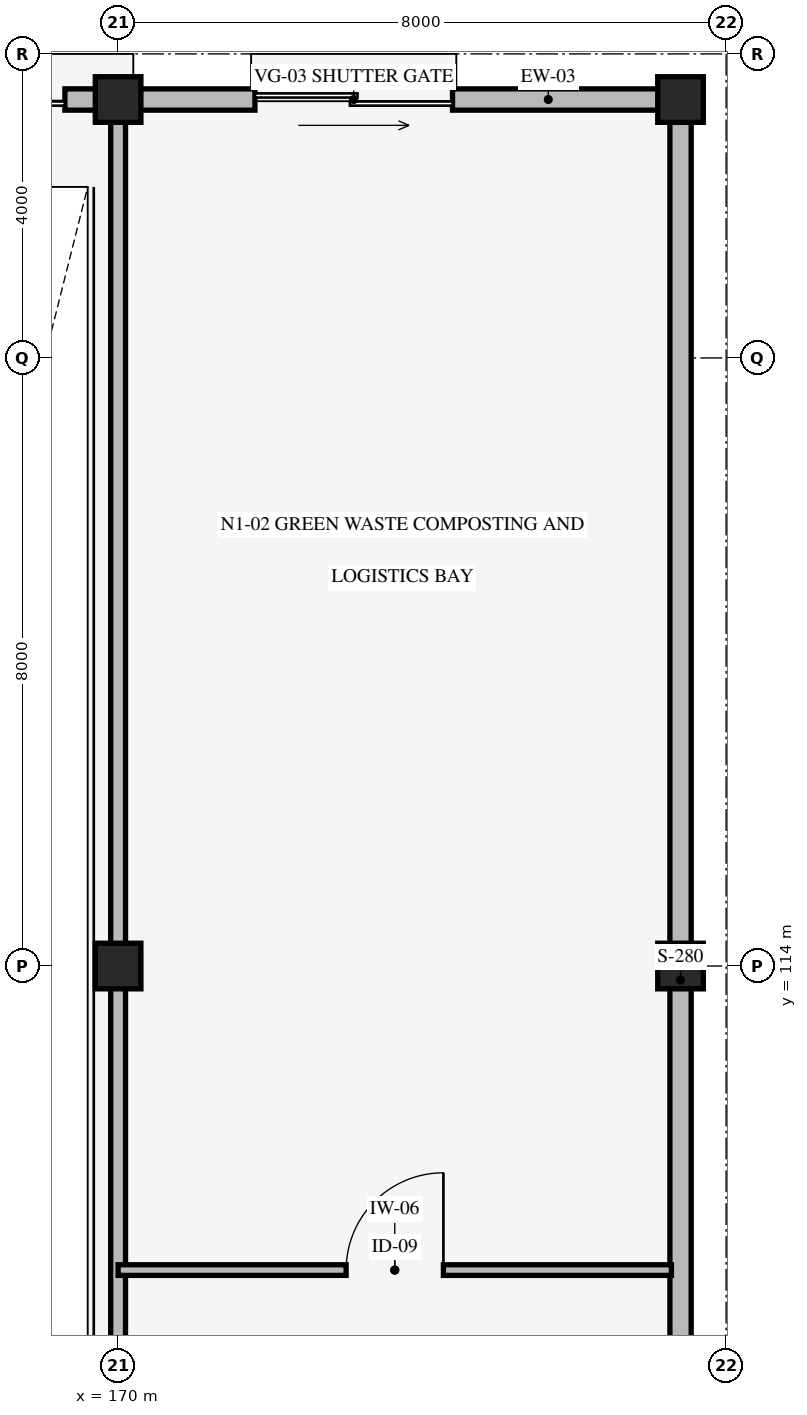
"""IFC4 building model, lengths in metres.
Left out: names, types, materials, properties, quantities, classifications, styles, units other than length and angle.
Written with IfcOpenShell. Run it as: python <this file> out.ifc"""

import sys

from ifc_helpers import new_model, si_unit, direction, frame, frame_2d, origin, origin_2d, place, context, subcontext, project, spatial, rectangle, extrude, element, fill, save


model = new_model("IFC4")
c1 = context("Model", 3, precision=1e-05, world=origin(), true_north=direction((0.0, 1.0)))
c2 = subcontext(c1, "Body", "Model", "MODEL_VIEW")
j1 = project(units=[si_unit("LENGTHUNIT", "METRE"), si_unit("PLANEANGLEUNIT", "RADIAN")], contexts=[c1])
p1 = place(None, origin())
s1 = spatial("IfcSite", under=j1, at=p1, CompositionType="ELEMENT")
p2 = place(p1, origin())
s2 = spatial("IfcBuilding", under=s1, at=p2, CompositionType="ELEMENT")
p3 = place(p2, origin())
s3 = spatial("IfcBuildingStorey", under=s2, at=p3, CompositionType="ELEMENT", Elevation=0.0)
p4 = place(p3, frame((170.0, 114.0, -0.28), z_axis=(0.0, 0.0, 1.0), x_axis=(1.0, 0.0, 0.0)))
e1 = element("IfcColumn", 1, at=p4, inside=s3, PredefinedType="COLUMN", context=c2, shape_type="SweptSolid", body=[
    extrude(rectangle(XDim=0.6, YDim=0.6, at=origin_2d()), origin(), (0.0, 0.0, 1.0), 6.8),
])
p5 = place(p3, frame((177.4, 114.0, -0.28), z_axis=(0.0, 0.0, 1.0), x_axis=(1.0, 0.0, 0.0)))
e2 = element("IfcColumn", 2, at=p5, inside=s3, PredefinedType="COLUMN", context=c2, shape_type="SweptSolid", body=[
    extrude(rectangle(XDim=0.6, YDim=0.6, at=origin_2d()), origin(), (0.0, 0.0, 1.0), 7.586),
])
p6 = place(p3, frame((170.0, 125.4, -0.28), z_axis=(0.0, 0.0, 1.0), x_axis=(1.0, 0.0, 0.0)))
e3 = element("IfcColumn", 3, at=p6, inside=s3, PredefinedType="COLUMN", context=c2, shape_type="SweptSolid", body=[
    extrude(rectangle(XDim=0.6, YDim=0.6, at=origin_2d()), origin(), (0.0, 0.0, 1.0), 6.8),
])
p7 = place(p3, frame((177.4, 125.4, -0.28), z_axis=(0.0, 0.0, 1.0), x_axis=(1.0, 0.0, 0.0)))
e4 = element("IfcColumn", 4, at=p7, inside=s3, PredefinedType="COLUMN", context=c2, shape_type="SweptSolid", body=[
    extrude(rectangle(XDim=0.6, YDim=0.6, at=origin_2d()), origin(), (0.0, 0.0, 1.0), 7.586),
])
p8 = place(p3, frame((162.0, 125.4, 0.0), z_axis=(0.0, 0.0, 1.0), x_axis=(1.0, 0.0, 0.0)))
e5 = element("IfcWall", 5, at=p8, inside=s3, PredefinedType="STANDARD", context=c2, shape_type="SweptSolid", body=[
    extrude(rectangle(XDim=15.4, YDim=0.28, at=frame_2d((7.7, 0.0))), origin(), (0.0, 0.0, 1.0), 5.7),
])
p9 = place(p8, frame((0.7, 0.0, 0.0)))
e6 = element("IfcOpeningElement", 6, at=p9, cuts=e5, PredefinedType="OPENING", context=c2, shape_type="SweptSolid", body=[
    extrude(rectangle(XDim=6.6, YDim=3.2, at=frame_2d((3.3, 1.6))), frame((0.0, 0.15, 0.0), z_axis=(0.0, -1.0, 0.0), x_axis=(1.0, 0.0, 0.0)), (0.0, 0.0, 1.0), 0.3),
])
p10 = place(p8, frame((9.8, 0.0, 0.0)))
e7 = element("IfcOpeningElement", 7, at=p10, cuts=e5, PredefinedType="OPENING", context=c2, shape_type="SweptSolid", body=[
    extrude(rectangle(XDim=2.6, YDim=2.5, at=frame_2d((1.3, 1.25))), frame((0.0, 0.15, 0.0), z_axis=(0.0, -1.0, 0.0), x_axis=(1.0, 0.0, 0.0)), (0.0, 0.0, 1.0), 0.3),
])
p11 = place(p3, frame((177.4, 125.4, 0.0), z_axis=(0.0, 0.0, 1.0), x_axis=(0.0, -1.0, 0.0)))
e8 = element("IfcWall", 8, at=p11, inside=s3, PredefinedType="STANDARD", context=c2, shape_type="SweptSolid", body=[
    extrude(rectangle(XDim=19.4, YDim=0.28, at=frame_2d((9.7, 0.0))), origin(), (0.0, 0.0, 1.0), 5.7),
])
p12 = place(p3, frame((170.0, 82.05, 0.0), z_axis=(0.0, 0.0, 1.0), x_axis=(0.0, 1.0, 0.0)))
e9 = element("IfcWall", 9, at=p12, inside=s3, PredefinedType="STANDARD", context=c2, shape_type="SweptSolid", body=[
    extrude(rectangle(XDim=43.3, YDim=0.195, at=frame_2d((21.65, 0.0))), origin(), (0.0, 0.0, 1.0), 5.1),
])
p13 = place(p3, frame((170.0, 110.0, 0.0), z_axis=(0.0, 0.0, 1.0), x_axis=(1.0, 0.0, 0.0)))
e10 = element("IfcWall", 10, at=p13, inside=s3, PredefinedType="STANDARD", context=c2, shape_type="SweptSolid", body=[
    extrude(rectangle(XDim=7.28, YDim=0.14, at=frame_2d((3.64, 0.0))), origin(), (0.0, 0.0, 1.0), 5.1),
])
p14 = place(p13, frame((3.0, 0.0, 0.0)))
e11 = element("IfcOpeningElement", 11, at=p14, cuts=e10, PredefinedType="OPENING", context=c2, shape_type="SweptSolid", body=[
    extrude(rectangle(XDim=1.28, YDim=2.14, at=frame_2d((0.64, 1.07))), frame((0.0, 0.08, 0.0), z_axis=(0.0, -1.0, 0.0), x_axis=(1.0, 0.0, 0.0)), (0.0, 0.0, 1.0), 0.16),
])
p15 = place(p9, origin())
e12 = element("IfcDoor", 12, at=p15, inside=s3, OperationType="ROLLINGUP", PredefinedType="GATE", context=c2, shape_type="SweptSolid", body=[
    extrude(rectangle(XDim=6.6, YDim=3.2, at=frame_2d((3.3, 1.6))), frame((0.0, 0.025, 0.0), z_axis=(0.0, -1.0, 0.0), x_axis=(1.0, 0.0, 0.0)), (0.0, 0.0, 1.0), 0.05),
])
fill(e6, e12)
p16 = place(p10, origin())
e13 = element("IfcDoor", 13, at=p16, inside=s3, OperationType="ROLLINGUP", PredefinedType="GATE", context=c2, shape_type="SweptSolid", body=[
    extrude(rectangle(XDim=2.6, YDim=2.5, at=frame_2d((1.3, 1.25))), frame((0.0, 0.025, 0.0), z_axis=(0.0, -1.0, 0.0), x_axis=(1.0, 0.0, 0.0)), (0.0, 0.0, 1.0), 0.05),
])
fill(e7, e13)
p17 = place(p14, origin())
e14 = element("IfcDoor", 14, at=p17, inside=s3, OperationType="SINGLE_SWING_RIGHT", PredefinedType="DOOR", context=c2, shape_type="SweptSolid", body=[
    extrude(rectangle(XDim=1.28, YDim=2.14, at=frame_2d((0.64, 1.07))), frame((0.0, 0.025, 0.0), z_axis=(0.0, -1.0, 0.0), x_axis=(1.0, 0.0, 0.0)), (0.0, 0.0, 1.0), 0.05),
])
fill(e11, e14)
save(model, sys.argv[1])
